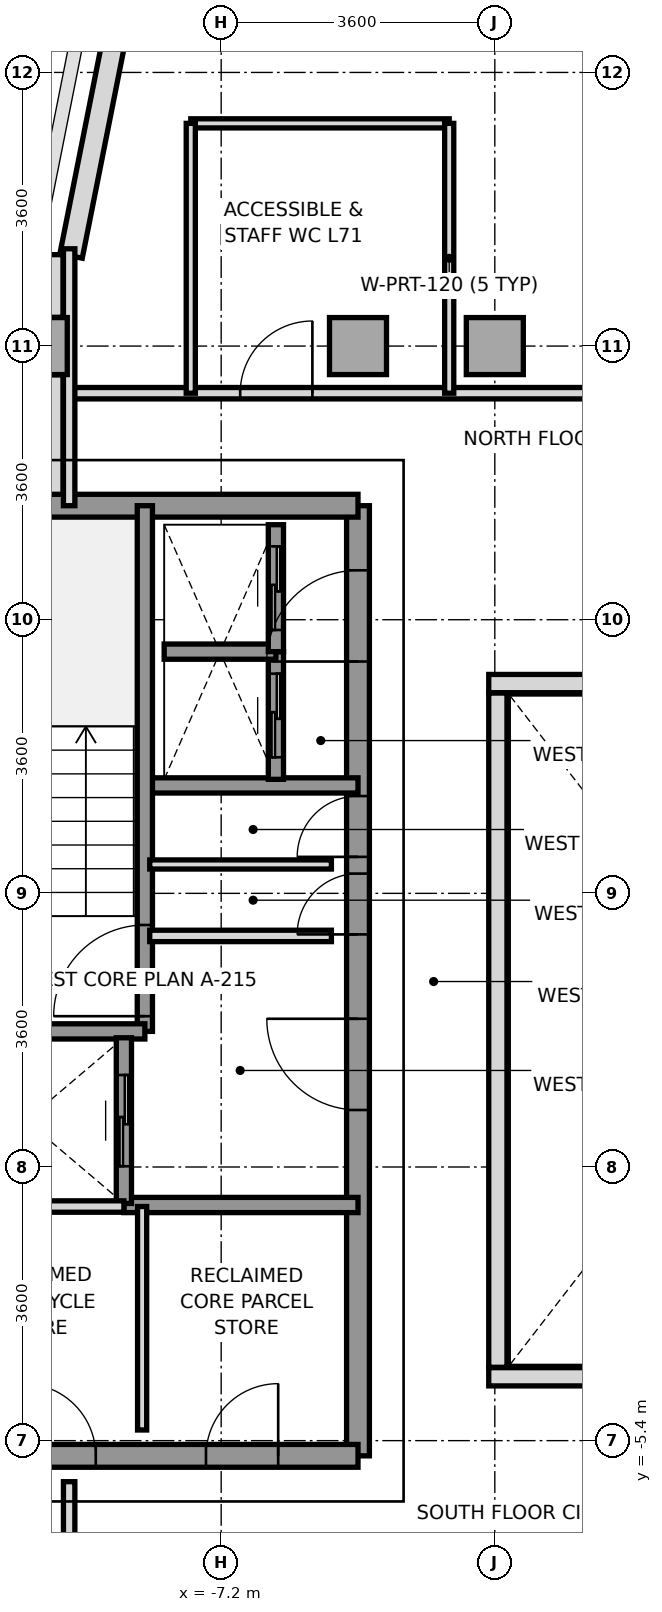
"""IFC4 building model, lengths in metres.
Left out: names, types, materials, properties, quantities, classifications, styles, units other than length and angle.
Written with IfcOpenShell. Run it as: python <this file> out.ifc"""

import sys

from ifc_helpers import new_model, si_unit, direction, frame, frame_2d, origin, origin_2d, place, context, subcontext, project, spatial, rectangle, extrude, source, transform, mapped, element, fill, save


model = new_model("IFC4")
c1 = context("Model", 3, precision=1e-05, world=origin(), true_north=direction((0.0, 1.0)))
c2 = subcontext(c1, "Body", "Model", "MODEL_VIEW")
j1 = project(units=[si_unit("LENGTHUNIT", "METRE"), si_unit("PLANEANGLEUNIT", "RADIAN")], contexts=[c1])
p1 = place(None, origin())
s1 = spatial("IfcSite", under=j1, at=p1, CompositionType="ELEMENT")
p2 = place(p1, origin())
s2 = spatial("IfcBuilding", under=s1, at=p2, CompositionType="ELEMENT")
p3 = place(p2, frame((0.0, 0.0, 255.6)))
s3 = spatial("IfcBuildingStorey", under=s2, at=p3, CompositionType="ELEMENT", Elevation=255.6)
m1 = source(origin(), c2, "Body", "SweptSolid", [
    extrude(rectangle(XDim=0.75, YDim=0.75, at=origin_2d()), origin(), (0.0, 0.0, 1.0), 3.01),
])
for number, where, z_axis, x_axis in (
    (1, (-9.6, 9.0, 0.0), (0.0, 0.0, 1.0), (1.0, 0.0, 0.0)),
    (2, (-5.4, 9.0, 0.0), (0.0, 0.0, 1.0), (1.0, 0.0, 0.0)),
    (3, (-3.6, 9.0, 0.0), (0.0, 0.0, 1.0), (1.0, 0.0, 0.0)),
):
    element("IfcColumn", number, at=place(p3, frame(where, z_axis=z_axis, x_axis=x_axis)), inside=s3, PredefinedType="COLUMN", context=c2, shape_type="MappedRepresentation", body=[
        mapped(m1, transform((0.0, 0.0, 0.0), x_axis=(1.0, 0.0, 0.0), y_axis=(0.0, 1.0, 0.0), z_axis=(0.0, 0.0, 1.0), scale=1.0)),
    ])
p4 = place(p3, frame((-8.471, 13.725, 0.0), z_axis=(0.0, 0.0, 1.0), x_axis=(-0.195114232679, -0.980780523974, 0.0)))
e4 = element("IfcWall", 4, at=p4, inside=s3, PredefinedType="SOLIDWALL", context=c2, shape_type="SweptSolid", body=[
    extrude(rectangle(XDim=3.609, YDim=0.3, at=frame_2d((1.804, 0.0))), origin(), (0.0, 0.0, 1.0), 3.01),
])
p5 = place(p3, frame((-9.4, 6.953, 0.0), z_axis=(0.0, 0.0, 1.0), x_axis=(0.0, 1.0, 0.0)))
e5 = element("IfcWall", 5, at=p5, inside=s3, PredefinedType="PARAPET", context=c2, shape_type="SweptSolid", body=[
    extrude(rectangle(XDim=1.669, YDim=0.24, at=frame_2d((0.834, 0.0))), origin(), (0.0, 0.0, 1.0), 1.15),
])
p6 = place(p3, frame((-9.4, 9.378, 0.0), z_axis=(0.0, 0.0, 1.0), x_axis=(0.0, 1.0, 0.0)))
e6 = element("IfcWall", 6, at=p6, inside=s3, PredefinedType="PARAPET", context=c2, shape_type="SweptSolid", body=[
    extrude(rectangle(XDim=0.825, YDim=0.24, at=frame_2d((0.413, 0.0))), origin(), (0.0, 0.0, 1.0), 1.15),
])
p7 = place(p3, frame((-5.4, -5.6, 0.0), z_axis=(0.0, 0.0, 1.0), x_axis=(0.0, 1.0, 0.0)))
e7 = element("IfcWall", 7, at=p7, inside=s3, PredefinedType="SHEAR", context=c2, shape_type="SweptSolid", body=[
    extrude(rectangle(XDim=12.5, YDim=0.3, at=frame_2d((6.25, 0.0))), origin(), (0.0, 0.0, 1.0), 3.01),
])
p8 = place(p7, frame((4.55, 0.0, 0.0)))
e8 = element("IfcOpeningElement", 8, at=p8, cuts=e7, PredefinedType="OPENING", context=c2, shape_type="SweptSolid", body=[
    extrude(rectangle(XDim=1.2, YDim=2.2, at=frame_2d((0.6, 1.1))), frame((0.0, 0.16, 0.0), z_axis=(0.0, -1.0, 0.0), x_axis=(1.0, 0.0, 0.0)), (0.0, 0.0, 1.0), 0.32),
])
p9 = place(p7, frame((10.45, 0.0, 0.0)))
e9 = element("IfcOpeningElement", 9, at=p9, cuts=e7, PredefinedType="OPENING", context=c2, shape_type="SweptSolid", body=[
    extrude(rectangle(XDim=1.2, YDim=2.2, at=frame_2d((0.6, 1.1))), frame((0.0, 0.16, 0.0), z_axis=(0.0, -1.0, 0.0), x_axis=(1.0, 0.0, 0.0)), (0.0, 0.0, 1.0), 0.32),
])
p10 = place(p7, frame((6.86, 0.0, 0.0)))
e10 = element("IfcOpeningElement", 10, at=p10, cuts=e7, PredefinedType="OPENING", context=c2, shape_type="SweptSolid", body=[
    extrude(rectangle(XDim=0.8, YDim=2.1, at=frame_2d((0.4, 1.05))), frame((0.0, 0.16, 0.0), z_axis=(0.0, -1.0, 0.0), x_axis=(1.0, 0.0, 0.0)), (0.0, 0.0, 1.0), 0.32),
])
p11 = place(p7, frame((7.88, 0.0, 0.0)))
e11 = element("IfcOpeningElement", 11, at=p11, cuts=e7, PredefinedType="OPENING", context=c2, shape_type="SweptSolid", body=[
    extrude(rectangle(XDim=0.8, YDim=2.1, at=frame_2d((0.4, 1.05))), frame((0.0, 0.16, 0.0), z_axis=(0.0, -1.0, 0.0), x_axis=(1.0, 0.0, 0.0)), (0.0, 0.0, 1.0), 0.32),
])
p12 = place(p3, frame((-11.356, 6.9, 0.0), z_axis=(0.0, 0.0, 1.0), x_axis=(1.0, 0.0, 0.0)))
e12 = element("IfcWall", 12, at=p12, inside=s3, PredefinedType="SHEAR", context=c2, shape_type="SweptSolid", body=[
    extrude(rectangle(XDim=5.956, YDim=0.3, at=frame_2d((2.978, 0.0))), origin(), (0.0, 0.0, 1.0), 3.01),
])
p13 = place(p3, frame((-13.2, -5.6, 0.0), z_axis=(0.0, 0.0, 1.0), x_axis=(1.0, 0.0, 0.0)))
e13 = element("IfcWall", 13, at=p13, inside=s3, PredefinedType="SHEAR", context=c2, shape_type="SweptSolid", body=[
    extrude(rectangle(XDim=7.8, YDim=0.3, at=frame_2d((3.9, 0.0))), origin(), (0.0, 0.0, 1.0), 3.01),
])
p14 = place(p13, frame((0.65, 0.0, 0.0)))
e14 = element("IfcOpeningElement", 14, at=p14, cuts=e13, PredefinedType="OPENING", context=c2, shape_type="SweptSolid", body=[
    extrude(rectangle(XDim=0.8, YDim=2.1, at=frame_2d((0.4, 1.05))), frame((0.0, 0.16, 0.0), z_axis=(0.0, -1.0, 0.0), x_axis=(1.0, 0.0, 0.0)), (0.0, 0.0, 1.0), 0.32),
])
p15 = place(p13, frame((3.4, 0.0, 0.0)))
e15 = element("IfcOpeningElement", 15, at=p15, cuts=e13, PredefinedType="OPENING", context=c2, shape_type="SweptSolid", body=[
    extrude(rectangle(XDim=0.95, YDim=2.15, at=frame_2d((0.475, 1.075))), frame((0.0, 0.16, 0.0), z_axis=(0.0, -1.0, 0.0), x_axis=(1.0, 0.0, 0.0)), (0.0, 0.0, 1.0), 0.32),
])
p16 = place(p13, frame((5.8, 0.0, 0.0)))
e16 = element("IfcOpeningElement", 16, at=p16, cuts=e13, PredefinedType="OPENING", context=c2, shape_type="SweptSolid", body=[
    extrude(rectangle(XDim=0.95, YDim=2.15, at=frame_2d((0.475, 1.075))), frame((0.0, 0.16, 0.0), z_axis=(0.0, -1.0, 0.0), x_axis=(1.0, 0.0, 0.0)), (0.0, 0.0, 1.0), 0.32),
])
p17 = place(p3, frame((-8.18, 3.22, 0.0), z_axis=(0.0, 0.0, 1.0), x_axis=(1.0, 0.0, 0.0)))
e17 = element("IfcWall", 17, at=p17, inside=s3, PredefinedType="SOLIDWALL", context=c2, shape_type="SweptSolid", body=[
    extrude(rectangle(XDim=2.78, YDim=0.2, at=frame_2d((1.39, 0.0))), origin(), (0.0, 0.0, 1.0), 3.01),
])
p18 = place(p3, frame((-8.48, -2.3, 0.0), z_axis=(0.0, 0.0, 1.0), x_axis=(1.0, 0.0, 0.0)))
e18 = element("IfcWall", 18, at=p18, inside=s3, PredefinedType="SOLIDWALL", context=c2, shape_type="SweptSolid", body=[
    extrude(rectangle(XDim=3.08, YDim=0.2, at=frame_2d((1.54, 0.0))), origin(), (0.0, 0.0, 1.0), 3.01),
])
p19 = place(p3, frame((-8.204, -0.016, 0.0), z_axis=(0.0, 0.0, 1.0), x_axis=(0.0, 1.0, 0.0)))
e19 = element("IfcWall", 19, at=p19, inside=s3, PredefinedType="SOLIDWALL", context=c2, shape_type="SweptSolid", body=[
    extrude(rectangle(XDim=6.916, YDim=0.2, at=frame_2d((3.458, 0.0))), origin(), (0.0, 0.0, 1.0), 3.01),
])
p20 = place(p19, frame((0.2, 0.0, 0.0)))
e20 = element("IfcOpeningElement", 20, at=p20, cuts=e19, PredefinedType="OPENING", context=c2, shape_type="SweptSolid", body=[
    extrude(rectangle(XDim=1.2, YDim=2.2, at=frame_2d((0.6, 1.1))), frame((0.0, 0.11, 0.0), z_axis=(0.0, -1.0, 0.0), x_axis=(1.0, 0.0, 0.0)), (0.0, 0.0, 1.0), 0.22),
])
p21 = place(p3, frame((-11.356, -0.016, 0.0), z_axis=(0.0, 0.0, 1.0), x_axis=(1.0, 0.0, 0.0)))
e21 = element("IfcWall", 21, at=p21, inside=s3, PredefinedType="SOLIDWALL", context=c2, shape_type="SweptSolid", body=[
    extrude(rectangle(XDim=3.152, YDim=0.2, at=frame_2d((1.576, 0.0))), origin(), (0.0, 0.0, 1.0), 3.01),
])
p22 = place(p3, frame((-8.48, -2.28, 0.0), z_axis=(0.0, 0.0, 1.0), x_axis=(0.0, 1.0, 0.0)))
e22 = element("IfcWall", 22, at=p22, inside=s3, PredefinedType="SOLIDWALL", context=c2, shape_type="SweptSolid", body=[
    extrude(rectangle(XDim=2.18, YDim=0.2, at=frame_2d((1.09, 0.0))), origin(), (0.0, 0.0, 1.0), 3.01),
])
p23 = place(p22, frame((0.49, 0.0, 0.0)))
e23 = element("IfcOpeningElement", 23, at=p23, cuts=e22, PredefinedType="OPENING", context=c2, shape_type="SweptSolid", body=[
    extrude(rectangle(XDim=1.2, YDim=2.2, at=frame_2d((0.6, 1.1))), frame((0.0, 0.11, 0.0), z_axis=(0.0, -1.0, 0.0), x_axis=(1.0, 0.0, 0.0)), (0.0, 0.0, 1.0), 0.22),
])
p24 = place(p3, frame((-6.48, 3.3, 0.0), z_axis=(0.0, 0.0, 1.0), x_axis=(0.0, 1.0, 0.0)))
e24 = element("IfcWall", 24, at=p24, inside=s3, PredefinedType="SOLIDWALL", context=c2, shape_type="SweptSolid", body=[
    extrude(rectangle(XDim=1.68, YDim=0.2, at=frame_2d((0.84, 0.0))), origin(), (0.0, 0.0, 1.0), 3.01),
])
p25 = place(p24, frame((0.29, 0.0, 0.0)))
e25 = element("IfcOpeningElement", 25, at=p25, cuts=e24, PredefinedType="OPENING", context=c2, shape_type="SweptSolid", body=[
    extrude(rectangle(XDim=1.1, YDim=2.2, at=frame_2d((0.55, 1.1))), frame((0.0, 0.11, 0.0), z_axis=(0.0, -1.0, 0.0), x_axis=(1.0, 0.0, 0.0)), (0.0, 0.0, 1.0), 0.22),
])
p26 = place(p3, frame((-7.95, 4.98, 0.0), z_axis=(0.0, 0.0, 1.0), x_axis=(1.0, 0.0, 0.0)))
e26 = element("IfcWall", 26, at=p26, inside=s3, PredefinedType="SOLIDWALL", context=c2, shape_type="SweptSolid", body=[
    extrude(rectangle(XDim=1.47, YDim=0.2, at=frame_2d((0.735, 0.0))), origin(), (0.0, 0.0, 1.0), 3.01),
])
p27 = place(p3, frame((-6.48, 4.98, 0.0), z_axis=(0.0, 0.0, 1.0), x_axis=(0.0, 1.0, 0.0)))
e27 = element("IfcWall", 27, at=p27, inside=s3, PredefinedType="SOLIDWALL", context=c2, shape_type="SweptSolid", body=[
    extrude(rectangle(XDim=1.67, YDim=0.2, at=frame_2d((0.835, 0.0))), origin(), (0.0, 0.0, 1.0), 3.01),
])
p28 = place(p27, frame((0.285, 0.0, 0.0)))
e28 = element("IfcOpeningElement", 28, at=p28, cuts=e27, PredefinedType="OPENING", context=c2, shape_type="SweptSolid", body=[
    extrude(rectangle(XDim=1.1, YDim=2.2, at=frame_2d((0.55, 1.1))), frame((0.0, 0.11, 0.0), z_axis=(0.0, -1.0, 0.0), x_axis=(1.0, 0.0, 0.0)), (0.0, 0.0, 1.0), 0.22),
])
p29 = place(p3, frame((-8.14, 1.24, 0.0), z_axis=(0.0, 0.0, 1.0), x_axis=(1.0, 0.0, 0.0)))
e29 = element("IfcWall", 29, at=p29, inside=s3, PredefinedType="PARTITIONING", context=c2, shape_type="SweptSolid", body=[
    extrude(rectangle(XDim=2.39, YDim=0.15, at=frame_2d((1.195, 0.0))), origin(), (0.0, 0.0, 1.0), 3.01),
])
p30 = place(p3, frame((-8.14, 2.18, 0.0), z_axis=(0.0, 0.0, 1.0), x_axis=(1.0, 0.0, 0.0)))
e30 = element("IfcWall", 30, at=p30, inside=s3, PredefinedType="PARTITIONING", context=c2, shape_type="SweptSolid", body=[
    extrude(rectangle(XDim=2.39, YDim=0.12, at=frame_2d((1.195, 0.0))), origin(), (0.0, 0.0, 1.0), 3.01),
])
p31 = place(p3, frame((-8.24, -5.26, 0.0), z_axis=(0.0, 0.0, 1.0), x_axis=(0.0, 1.0, 0.0)))
e31 = element("IfcWall", 31, at=p31, inside=s3, PredefinedType="PARTITIONING", context=c2, shape_type="SweptSolid", body=[
    extrude(rectangle(XDim=2.94, YDim=0.12, at=frame_2d((1.47, 0.0))), origin(), (0.0, 0.0, 1.0), 3.01),
])
p32 = place(p3, frame((-11.04, -2.32, 0.0), z_axis=(0.0, 0.0, 1.0), x_axis=(1.0, 0.0, 0.0)))
e32 = element("IfcWall", 32, at=p32, inside=s3, PredefinedType="PARTITIONING", context=c2, shape_type="SweptSolid", body=[
    extrude(rectangle(XDim=2.56, YDim=0.15, at=frame_2d((1.28, 0.0))), origin(), (0.0, 0.0, 1.0), 3.01),
])
p33 = place(p3, frame((-9.2, 8.38, 0.0), z_axis=(0.0, 0.0, 1.0), x_axis=(1.0, 0.0, 0.0)))
e33 = element("IfcWall", 33, at=p33, inside=s3, PredefinedType="PARTITIONING", context=c2, shape_type="SweptSolid", body=[
    extrude(rectangle(XDim=18.4, YDim=0.15, at=frame_2d((9.2, 0.0))), origin(), (0.0, 0.0, 1.0), 2.57),
])
p34 = place(p33, frame((2.25, 0.0, 0.0)))
e34 = element("IfcOpeningElement", 34, at=p34, cuts=e33, PredefinedType="OPENING", context=c2, shape_type="SweptSolid", body=[
    extrude(rectangle(XDim=0.95, YDim=2.15, at=frame_2d((0.475, 1.075))), frame((0.0, 0.085, 0.0), z_axis=(0.0, -1.0, 0.0), x_axis=(1.0, 0.0, 0.0)), (0.0, 0.0, 1.0), 0.17),
])
p35 = place(p33, frame((15.15, 0.0, 0.0)))
e35 = element("IfcOpeningElement", 35, at=p35, cuts=e33, PredefinedType="OPENING", context=c2, shape_type="SweptSolid", body=[
    extrude(rectangle(XDim=1.1, YDim=2.2, at=frame_2d((0.55, 1.1))), frame((0.0, 0.085, 0.0), z_axis=(0.0, -1.0, 0.0), x_axis=(1.0, 0.0, 0.0)), (0.0, 0.0, 1.0), 0.17),
])
p36 = place(p3, frame((-9.2, 6.9, 0.0), z_axis=(0.0, 0.0, 1.0), x_axis=(0.0, 1.0, 0.0)))
e36 = element("IfcWall", 36, at=p36, inside=s3, PredefinedType="PARTITIONING", context=c2, shape_type="SweptSolid", body=[
    extrude(rectangle(XDim=3.38, YDim=0.15, at=frame_2d((1.69, 0.0))), origin(), (0.0, 0.0, 1.0), 2.61),
])
p37 = place(p3, frame((-7.6, 11.93, 0.0), z_axis=(0.0, 0.0, 1.0), x_axis=(1.0, 0.0, 0.0)))
e37 = element("IfcWall", 37, at=p37, inside=s3, PredefinedType="PARTITIONING", context=c2, shape_type="SweptSolid", body=[
    extrude(rectangle(XDim=3.4, YDim=0.12, at=frame_2d((1.7, 0.0))), origin(), (0.0, 0.0, 1.0), 3.01),
])
for number, where, z_axis, x_axis in (
    (38, (-7.6, 8.38, 0.0), (0.0, 0.0, 1.0), (0.0, 1.0, 0.0)),
    (39, (-4.2, 8.38, 0.0), (0.0, 0.0, 1.0), (0.0, 1.0, 0.0)),
):
    element("IfcWall", number, at=place(p3, frame(where, z_axis=z_axis, x_axis=x_axis)), inside=s3, PredefinedType="PARTITIONING", context=c2, shape_type="SweptSolid", body=[
        extrude(rectangle(XDim=3.55, YDim=0.12, at=frame_2d((1.775, 0.0))), origin(), (0.0, 0.0, 1.0), 2.61),
    ])
p38 = place(p3, frame((-9.2, -10.28, 0.0), z_axis=(0.0, 0.0, 1.0), x_axis=(0.0, 1.0, 0.0)))
e40 = element("IfcWall", 40, at=p38, inside=s3, PredefinedType="PARTITIONING", context=c2, shape_type="SweptSolid", body=[
    extrude(rectangle(XDim=4.34, YDim=0.15, at=frame_2d((2.17, 0.0))), origin(), (0.0, 0.0, 1.0), 2.61),
])
for number, where, z_axis, x_axis in (
    (41, (-3.68, -4.56, 0.0), (0.0, 0.0, 1.0), (1.0, 0.0, 0.0)),
    (42, (-3.68, 4.56, 0.0), (0.0, 0.0, 1.0), (1.0, 0.0, 0.0)),
):
    element("IfcWall", number, at=place(p3, frame(where, z_axis=z_axis, x_axis=x_axis)), inside=s3, PredefinedType="PARAPET", context=c2, shape_type="SweptSolid", body=[
        extrude(rectangle(XDim=7.36, YDim=0.24, at=frame_2d((3.68, 0.0))), origin(), (0.0, 0.0, 1.0), 1.15),
    ])
p39 = place(p3, frame((-3.56, -4.435, 0.0), z_axis=(0.0, 0.0, 1.0), x_axis=(0.0, 1.0, 0.0)))
e43 = element("IfcWall", 43, at=p39, inside=s3, PredefinedType="PARAPET", context=c2, shape_type="SweptSolid", body=[
    extrude(rectangle(XDim=8.87, YDim=0.24, at=frame_2d((4.435, 0.0))), origin(), (0.0, 0.0, 1.0), 1.15),
])
m2 = source(origin(), c2, "Body", "SweptSolid", [
    extrude(rectangle(XDim=1.2, YDim=2.2, at=frame_2d((0.6, 1.1))), frame((0.0, 0.025, 0.0), z_axis=(0.0, -1.0, 0.0), x_axis=(1.0, 0.0, 0.0)), (0.0, 0.0, 1.0), 0.05),
])
p40 = place(p20, origin())
e44 = element("IfcDoor", 44, at=p40, inside=s3, OperationType="SINGLE_SWING_LEFT", PredefinedType="DOOR", context=c2, shape_type="MappedRepresentation", body=[
    mapped(m2, transform((0.0, 0.0, 0.0), x_axis=(1.0, 0.0, 0.0), y_axis=(0.0, 1.0, 0.0), z_axis=(0.0, 0.0, 1.0), scale=1.0)),
])
fill(e20, e44)
p41 = place(p8, origin())
e45 = element("IfcDoor", 45, at=p41, inside=s3, OperationType="SINGLE_SWING_RIGHT", PredefinedType="DOOR", context=c2, shape_type="MappedRepresentation", body=[
    mapped(m2, transform((0.0, 0.0, 0.0), x_axis=(1.0, 0.0, 0.0), y_axis=(0.0, 1.0, 0.0), z_axis=(0.0, 0.0, 1.0), scale=1.0)),
])
fill(e8, e45)
p42 = place(p9, origin())
e46 = element("IfcDoor", 46, at=p42, inside=s3, OperationType="SINGLE_SWING_LEFT", PredefinedType="DOOR", context=c2, shape_type="MappedRepresentation", body=[
    mapped(m2, transform((0.0, 0.0, 0.0), x_axis=(1.0, 0.0, 0.0), y_axis=(0.0, 1.0, 0.0), z_axis=(0.0, 0.0, 1.0), scale=1.0)),
])
fill(e9, e46)
m3 = source(origin(), c2, "Body", "SweptSolid", [
    extrude(rectangle(XDim=0.8, YDim=2.1, at=frame_2d((0.4, 1.05))), frame((0.0, 0.025, 0.0), z_axis=(0.0, -1.0, 0.0), x_axis=(1.0, 0.0, 0.0)), (0.0, 0.0, 1.0), 0.05),
])
p43 = place(p10, origin())
e47 = element("IfcDoor", 47, at=p43, inside=s3, OperationType="SINGLE_SWING_LEFT", PredefinedType="DOOR", context=c2, shape_type="MappedRepresentation", body=[
    mapped(m3, transform((0.0, 0.0, 0.0), x_axis=(1.0, 0.0, 0.0), y_axis=(0.0, 1.0, 0.0), z_axis=(0.0, 0.0, 1.0), scale=1.0)),
])
fill(e10, e47)
p44 = place(p11, origin())
e48 = element("IfcDoor", 48, at=p44, inside=s3, OperationType="SINGLE_SWING_LEFT", PredefinedType="DOOR", context=c2, shape_type="MappedRepresentation", body=[
    mapped(m3, transform((0.0, 0.0, 0.0), x_axis=(1.0, 0.0, 0.0), y_axis=(0.0, 1.0, 0.0), z_axis=(0.0, 0.0, 1.0), scale=1.0)),
])
fill(e11, e48)
m4 = source(origin(), c2, "Body", "SweptSolid", [
    extrude(rectangle(XDim=0.95, YDim=2.15, at=frame_2d((0.475, 1.075))), frame((0.0, 0.025, 0.0), z_axis=(0.0, -1.0, 0.0), x_axis=(1.0, 0.0, 0.0)), (0.0, 0.0, 1.0), 0.05),
])
p45 = place(p15, origin())
e49 = element("IfcDoor", 49, at=p45, inside=s3, OperationType="SINGLE_SWING_LEFT", PredefinedType="DOOR", context=c2, shape_type="MappedRepresentation", body=[
    mapped(m4, transform((0.0, 0.0, 0.0), x_axis=(1.0, 0.0, 0.0), y_axis=(0.0, 1.0, 0.0), z_axis=(0.0, 0.0, 1.0), scale=1.0)),
])
fill(e15, e49)
p46 = place(p16, origin())
e50 = element("IfcDoor", 50, at=p46, inside=s3, OperationType="SINGLE_SWING_RIGHT", PredefinedType="DOOR", context=c2, shape_type="MappedRepresentation", body=[
    mapped(m4, transform((0.0, 0.0, 0.0), x_axis=(1.0, 0.0, 0.0), y_axis=(0.0, 1.0, 0.0), z_axis=(0.0, 0.0, 1.0), scale=1.0)),
])
fill(e16, e50)
p47 = place(p23, origin())
e51 = element("IfcDoor", 51, at=p47, inside=s3, OperationType="SLIDING_TO_RIGHT", PredefinedType="DOOR", context=c2, shape_type="MappedRepresentation", body=[
    mapped(m2, transform((0.0, 0.0, 0.0), x_axis=(1.0, 0.0, 0.0), y_axis=(0.0, 1.0, 0.0), z_axis=(0.0, 0.0, 1.0), scale=1.0)),
])
fill(e23, e51)
m5 = source(origin(), c2, "Body", "SweptSolid", [
    extrude(rectangle(XDim=1.1, YDim=2.2, at=frame_2d((0.55, 1.1))), frame((0.0, 0.025, 0.0), z_axis=(0.0, -1.0, 0.0), x_axis=(1.0, 0.0, 0.0)), (0.0, 0.0, 1.0), 0.05),
])
p48 = place(p25, origin())
e52 = element("IfcDoor", 52, at=p48, inside=s3, OperationType="SLIDING_TO_LEFT", PredefinedType="DOOR", context=c2, shape_type="MappedRepresentation", body=[
    mapped(m5, transform((0.0, 0.0, 0.0), x_axis=(1.0, 0.0, 0.0), y_axis=(0.0, 1.0, 0.0), z_axis=(0.0, 0.0, 1.0), scale=1.0)),
])
fill(e25, e52)
p49 = place(p28, origin())
e53 = element("IfcDoor", 53, at=p49, inside=s3, OperationType="SLIDING_TO_LEFT", PredefinedType="DOOR", context=c2, shape_type="MappedRepresentation", body=[
    mapped(m5, transform((0.0, 0.0, 0.0), x_axis=(1.0, 0.0, 0.0), y_axis=(0.0, 1.0, 0.0), z_axis=(0.0, 0.0, 1.0), scale=1.0)),
])
fill(e28, e53)
p50 = place(p34, origin())
e54 = element("IfcDoor", 54, at=p50, inside=s3, OperationType="SINGLE_SWING_RIGHT", PredefinedType="DOOR", context=c2, shape_type="MappedRepresentation", body=[
    mapped(m4, transform((0.0, 0.0, 0.0), x_axis=(1.0, 0.0, 0.0), y_axis=(0.0, 1.0, 0.0), z_axis=(0.0, 0.0, 1.0), scale=1.0)),
])
fill(e34, e54)
save(model, sys.argv[1])
